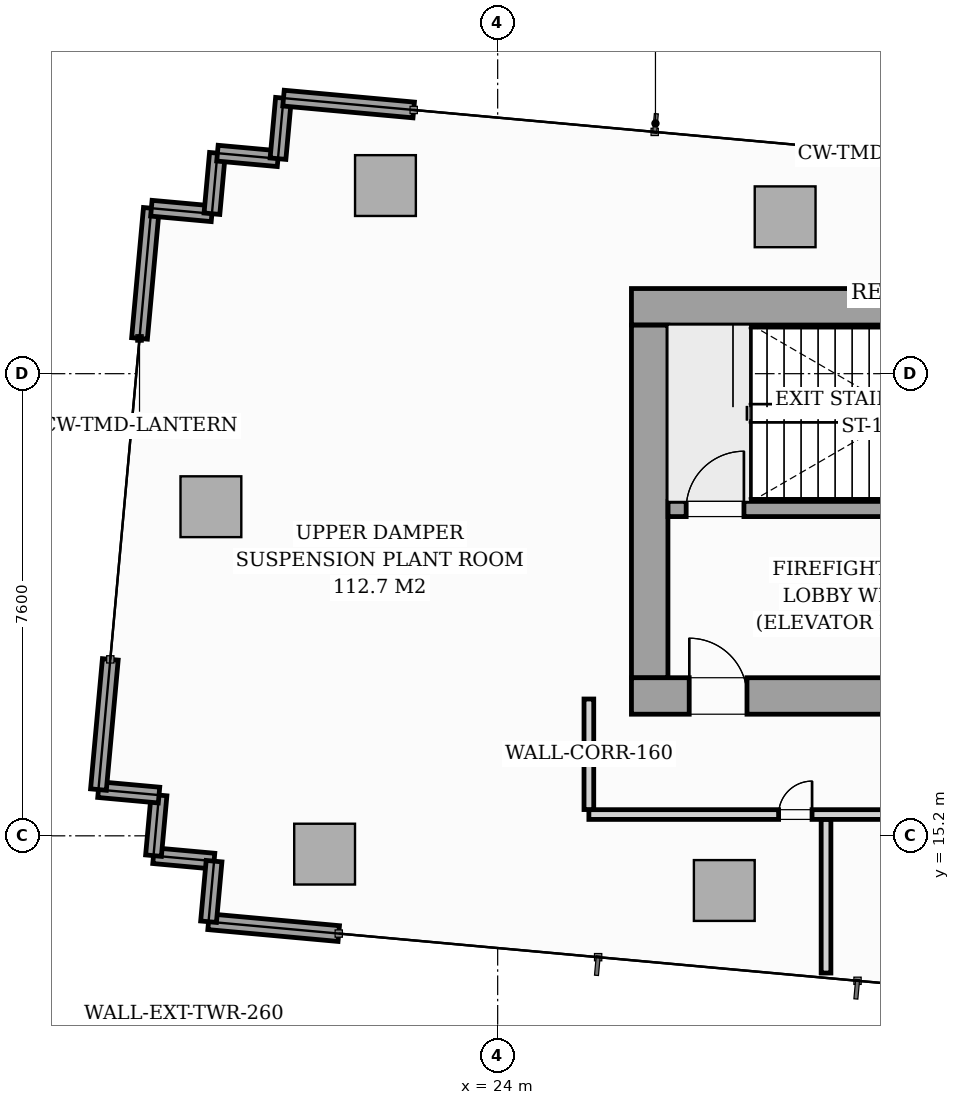
"""IFC4 building model, lengths in metres.
Left out: names, types, materials, properties, quantities, classifications, styles, units other than length and angle.
Written with IfcOpenShell. Run it as: python <this file> out.ifc"""

import sys

from ifc_helpers import new_model, si_unit, direction, frame, frame_2d, origin, origin_2d, place, context, subcontext, project, spatial, rectangle, i_section, extrude, source, transform, mapped, element, fill, save


model = new_model("IFC4")
c1 = context("Model", 3, precision=1e-05, world=origin(), true_north=direction((0.0, 1.0)))
c2 = subcontext(c1, "Body", "Model", "MODEL_VIEW")
j1 = project(units=[si_unit("LENGTHUNIT", "METRE"), si_unit("PLANEANGLEUNIT", "RADIAN")], contexts=[c1])
p1 = place(None, origin())
s1 = spatial("IfcSite", under=j1, at=p1, CompositionType="ELEMENT")
p2 = place(p1, origin())
s2 = spatial("IfcBuilding", under=s1, at=p2, CompositionType="ELEMENT")
p3 = place(p2, frame((0.0, 0.0, 270.8)))
s3 = spatial("IfcBuildingStorey", under=s2, at=p3, CompositionType="ELEMENT", Elevation=270.8)
m1 = source(origin(), c2, "Body", "SweptSolid", [
    extrude(i_section(OverallWidth=0.404, OverallDepth=0.407, WebThickness=0.027, FlangeThickness=0.044, FilletRadius=0.018, at=origin_2d()), origin(), (0.0, 0.0, 1.0), 6.496),
])
for number, where, z_axis, x_axis in (
    (1, (26.4, 17.4, 0.002), (0.0, 0.0, 1.0), (1.0, 0.0, 0.0)),
    (2, (26.4, 24.0, 0.002), (0.0, 0.0, 1.0), (1.0, 0.0, 0.0)),
):
    element("IfcColumn", number, at=place(p3, frame(where, z_axis=z_axis, x_axis=x_axis)), inside=s3, PredefinedType="PILASTER", context=c2, shape_type="MappedRepresentation", body=[
        mapped(m1, transform((0.0, 0.0, 0.0), scale=1.0)),
    ])
m2 = source(origin(), c2, "Body", "SweptSolid", [
    extrude(rectangle(XDim=1.0, YDim=1.0, at=origin_2d()), origin(), (0.0, 0.0, 1.0), 6.496),
])
for number, where, z_axis, x_axis in (
    (3, (21.154, 14.899, 0.002), (0.0, 0.0, 1.0), (0.996, -0.091, 0.0)),
    (4, (27.727, 14.301, 0.002), (0.0, 0.0, 1.0), (0.996, -0.091, 0.0)),
    (5, (22.155, 25.894, 0.002), (0.0, 0.0, 1.0), (0.996, -0.091, 0.0)),
    (6, (28.728, 25.38, 0.002), (0.0, 0.0, 1.0), (0.996, -0.091, 0.0)),
    (7, (19.284, 20.612, 0.002), (0.0, 0.0, 1.0), (0.996, -0.091, 0.0)),
):
    element("IfcColumn", number, at=place(p3, frame(where, z_axis=z_axis, x_axis=x_axis)), inside=s3, PredefinedType="COLUMN", context=c2, shape_type="MappedRepresentation", body=[
        mapped(m2, transform((0.0, 0.0, 0.0), scale=1.0)),
    ])
p4 = place(p3, frame((19.336, 14.783, 0.0), z_axis=(0.0, 0.0, 1.0), x_axis=(-0.995891205479, 0.090557754224, 0.0)))
e8 = element("IfcWall", 8, at=p4, inside=s3, PredefinedType="STANDARD", context=c2, shape_type="SweptSolid", body=[
    extrude(rectangle(XDim=1.0, YDim=0.26, at=frame_2d((0.5, 0.0))), origin(), (0.0, 0.0, 1.0), 6.22),
])
p5 = place(p3, frame((18.34, 14.874, 0.0), z_axis=(0.0, 0.0, 1.0), x_axis=(0.090821912176, 0.995867149909, 0.0)))
e9 = element("IfcWall", 9, at=p5, inside=s3, PredefinedType="STANDARD", context=c2, shape_type="SweptSolid", body=[
    extrude(rectangle(XDim=1.0, YDim=0.26, at=frame_2d((0.5, 0.0))), origin(), (0.0, 0.0, 1.0), 6.22),
])
p6 = place(p3, frame((18.431, 15.87, 0.0), z_axis=(0.0, 0.0, 1.0), x_axis=(-0.995891205479, 0.090557754224, 0.0)))
e10 = element("IfcWall", 10, at=p6, inside=s3, PredefinedType="STANDARD", context=c2, shape_type="SweptSolid", body=[
    extrude(rectangle(XDim=1.0, YDim=0.26, at=frame_2d((0.5, 0.0))), origin(), (0.0, 0.0, 1.0), 6.22),
])
p7 = place(p3, frame((17.435, 15.96, 0.0), z_axis=(0.0, 0.0, 1.0), x_axis=(0.090720017492, 0.995876437329, 0.0)))
e11 = element("IfcWall", 11, at=p7, inside=s3, PredefinedType="STANDARD", context=c2, shape_type="SweptSolid", body=[
    extrude(rectangle(XDim=2.15, YDim=0.26, at=frame_2d((1.075, 0.0))), origin(), (0.0, 0.0, 1.0), 6.22),
])
p8 = place(p3, frame((18.11, 23.38, 0.0), z_axis=(0.0, 0.0, 1.0), x_axis=(0.090617654952, 0.995885756807, 0.0)))
e12 = element("IfcWall", 12, at=p8, inside=s3, PredefinedType="STANDARD", context=c2, shape_type="SweptSolid", body=[
    extrude(rectangle(XDim=2.15, YDim=0.26, at=frame_2d((1.075, 0.0))), origin(), (0.0, 0.0, 1.0), 6.22),
])
for number, where, z_axis, x_axis in (
    (13, (18.305, 25.521, 0.0), (0.0, 0.0, 1.0), (0.996, -0.091, 0.0)),
    (14, (19.301, 25.43, 0.0), (0.0, 0.0, 1.0), (0.091, 0.996, 0.0)),
    (15, (19.392, 26.426, 0.0), (0.0, 0.0, 1.0), (0.996, -0.091, 0.0)),
    (16, (20.387, 26.336, 0.0), (0.0, 0.0, 1.0), (0.091, 0.996, 0.0)),
):
    element("IfcWall", number, at=place(p3, frame(where, z_axis=z_axis, x_axis=x_axis)), inside=s3, PredefinedType="STANDARD", context=c2, shape_type="SweptSolid", body=[
        extrude(rectangle(XDim=1.0, YDim=0.26, at=frame_2d((0.5, 0.0))), origin(), (0.0, 0.0, 1.0), 6.22),
    ])
p9 = place(p3, frame((20.478, 27.332, 0.0), z_axis=(0.0, 0.0, 1.0), x_axis=(0.995885756807, -0.090617654952, 0.0)))
e17 = element("IfcWall", 17, at=p9, inside=s3, PredefinedType="STANDARD", context=c2, shape_type="SweptSolid", body=[
    extrude(rectangle(XDim=2.15, YDim=0.26, at=frame_2d((1.075, 0.0))), origin(), (0.0, 0.0, 1.0), 6.22),
])
p10 = place(p3, frame((21.387, 13.593, 0.0), z_axis=(0.0, 0.0, 1.0), x_axis=(-0.995876437329, 0.090720017492, 0.0)))
e18 = element("IfcWall", 18, at=p10, inside=s3, PredefinedType="STANDARD", context=c2, shape_type="SweptSolid", body=[
    extrude(rectangle(XDim=2.15, YDim=0.26, at=frame_2d((1.075, 0.0))), origin(), (0.0, 0.0, 1.0), 6.22),
])
p11 = place(p3, frame((19.245, 13.788, 0.0), z_axis=(0.0, 0.0, 1.0), x_axis=(0.090821912176, 0.995867149909, 0.0)))
e19 = element("IfcWall", 19, at=p11, inside=s3, PredefinedType="STANDARD", context=c2, shape_type="SweptSolid", body=[
    extrude(rectangle(XDim=1.0, YDim=0.26, at=frame_2d((0.5, 0.0))), origin(), (0.0, 0.0, 1.0), 6.22),
])
p12 = place(p3, frame((26.2, 17.5, 0.0), z_axis=(0.0, 0.0, 1.0), x_axis=(1.0, 0.0, 0.0)))
e20 = element("IfcWall", 20, at=p12, inside=s3, PredefinedType="SHEAR", context=c2, shape_type="SweptSolid", body=[
    extrude(rectangle(XDim=19.6, YDim=0.6, at=frame_2d((9.8, 0.0))), origin(), (0.0, 0.0, 1.0), 6.5),
])
p13 = place(p12, frame((0.95, 0.0, 0.0)))
e21 = element("IfcOpeningElement", 21, at=p13, cuts=e20, PredefinedType="OPENING", context=c2, shape_type="SweptSolid", body=[
    extrude(rectangle(XDim=0.95, YDim=2.06, at=frame_2d((0.475, 1.03))), frame((0.0, 0.31, 0.0), z_axis=(0.0, -1.0, 0.0), x_axis=(1.0, 0.0, 0.0)), (0.0, 0.0, 1.0), 0.62),
])
p14 = place(p12, frame((9.38, 0.0, 0.0)))
e22 = element("IfcOpeningElement", 22, at=p14, cuts=e20, PredefinedType="OPENING", context=c2, shape_type="SweptSolid", body=[
    extrude(rectangle(XDim=0.9, YDim=2.06, at=frame_2d((0.45, 1.03))), frame((0.0, 0.31, 0.0), z_axis=(0.0, -1.0, 0.0), x_axis=(1.0, 0.0, 0.0)), (0.0, 0.0, 1.0), 0.62),
])
p15 = place(p12, frame((17.55, 0.0, 0.0)))
e23 = element("IfcOpeningElement", 23, at=p15, cuts=e20, PredefinedType="OPENING", context=c2, shape_type="SweptSolid", body=[
    extrude(rectangle(XDim=0.95, YDim=2.06, at=frame_2d((0.475, 1.03))), frame((0.0, 0.31, 0.0), z_axis=(0.0, -1.0, 0.0), x_axis=(1.0, 0.0, 0.0)), (0.0, 0.0, 1.0), 0.62),
])
p16 = place(p3, frame((26.2, 23.9, 0.0), z_axis=(0.0, 0.0, 1.0), x_axis=(1.0, 0.0, 0.0)))
e24 = element("IfcWall", 24, at=p16, inside=s3, PredefinedType="SHEAR", context=c2, shape_type="SweptSolid", body=[
    extrude(rectangle(XDim=19.6, YDim=0.6, at=frame_2d((9.8, 0.0))), origin(), (0.0, 0.0, 1.0), 6.5),
])
p17 = place(p3, frame((26.5, 17.802, 0.0), z_axis=(0.0, 0.0, 1.0), x_axis=(0.0, 1.0, 0.0)))
e25 = element("IfcWall", 25, at=p17, inside=s3, PredefinedType="SHEAR", context=c2, shape_type="SweptSolid", body=[
    extrude(rectangle(XDim=5.796, YDim=0.6, at=frame_2d((2.898, 0.0))), origin(), (0.0, 0.0, 1.0), 6.5),
])
p18 = place(p3, frame((26.802, 20.575, 0.0), z_axis=(0.0, 0.0, 1.0), x_axis=(1.0, 0.0, 0.0)))
e26 = element("IfcWall", 26, at=p18, inside=s3, PredefinedType="SOLIDWALL", context=c2, shape_type="SweptSolid", body=[
    extrude(rectangle(XDim=8.148, YDim=0.25, at=frame_2d((4.074, 0.0))), origin(), (0.0, 0.0, 1.0), 6.5),
])
p19 = place(p18, frame((0.298, 0.0, 0.0)))
e27 = element("IfcOpeningElement", 27, at=p19, cuts=e26, PredefinedType="OPENING", context=c2, shape_type="SweptSolid", body=[
    extrude(rectangle(XDim=0.95, YDim=2.06, at=frame_2d((0.475, 1.03))), frame((0.0, 0.135, 0.0), z_axis=(0.0, -1.0, 0.0), x_axis=(1.0, 0.0, 0.0)), (0.0, 0.0, 1.0), 0.27),
])
p20 = place(p3, frame((25.5, 15.55, 0.0), z_axis=(0.0, 0.0, 1.0), x_axis=(1.0, 0.0, 0.0)))
e28 = element("IfcWall", 28, at=p20, inside=s3, PredefinedType="PARTITIONING", context=c2, shape_type="SweptSolid", body=[
    extrude(rectangle(XDim=21.0, YDim=0.16, at=frame_2d((10.5, 0.0))), origin(), (0.0, 0.0, 1.0), 5.785),
])
p21 = place(p20, frame((3.12, 0.0, 0.0)))
e29 = element("IfcOpeningElement", 29, at=p21, cuts=e28, PredefinedType="OPENING", context=c2, shape_type="SweptSolid", body=[
    extrude(rectangle(XDim=0.55, YDim=2.02, at=frame_2d((0.275, 1.01))), frame((0.0, 0.09, 0.0), z_axis=(0.0, -1.0, 0.0), x_axis=(1.0, 0.0, 0.0)), (0.0, 0.0, 1.0), 0.18),
])
p22 = place(p20, frame((5.45, 0.0, 0.0)))
e30 = element("IfcOpeningElement", 30, at=p22, cuts=e28, PredefinedType="OPENING", context=c2, shape_type="SweptSolid", body=[
    extrude(rectangle(XDim=1.2, YDim=2.08, at=frame_2d((0.6, 1.04))), frame((0.0, 0.09, 0.0), z_axis=(0.0, -1.0, 0.0), x_axis=(1.0, 0.0, 0.0)), (0.0, 0.0, 1.0), 0.18),
])
p23 = place(p20, frame((17.1, 0.0, 0.0)))
e31 = element("IfcOpeningElement", 31, at=p23, cuts=e28, PredefinedType="OPENING", context=c2, shape_type="SweptSolid", body=[
    extrude(rectangle(XDim=1.2, YDim=2.08, at=frame_2d((0.6, 1.04))), frame((0.0, 0.09, 0.0), z_axis=(0.0, -1.0, 0.0), x_axis=(1.0, 0.0, 0.0)), (0.0, 0.0, 1.0), 0.18),
])
p24 = place(p3, frame((25.5, 15.632, 0.0), z_axis=(0.0, 0.0, 1.0), x_axis=(0.0, 1.0, 0.0)))
e32 = element("IfcWall", 32, at=p24, inside=s3, PredefinedType="PARTITIONING", context=c2, shape_type="SweptSolid", body=[
    extrude(rectangle(XDim=1.818, YDim=0.16, at=frame_2d((0.909, 0.0))), origin(), (0.0, 0.0, 1.0), 6.22),
])
p25 = place(p3, frame((29.4, 12.944, 0.0), z_axis=(0.0, 0.0, 1.0), x_axis=(0.0, 1.0, 0.0)))
e33 = element("IfcWall", 33, at=p25, inside=s3, PredefinedType="PARTITIONING", context=c2, shape_type="SweptSolid", body=[
    extrude(rectangle(XDim=2.524, YDim=0.16, at=frame_2d((1.262, 0.0))), origin(), (0.0, 0.0, 1.0), 6.22),
])
m3 = source(origin(), c2, "Body", "SweptSolid", [
    extrude(rectangle(XDim=0.95, YDim=2.06, at=frame_2d((0.475, 1.03))), frame((0.0, 0.025, 0.0), z_axis=(0.0, -1.0, 0.0), x_axis=(1.0, 0.0, 0.0)), (0.0, 0.0, 1.0), 0.05),
])
p26 = place(p13, origin())
e34 = element("IfcDoor", 34, at=p26, inside=s3, OperationType="SINGLE_SWING_LEFT", PredefinedType="DOOR", context=c2, shape_type="MappedRepresentation", body=[
    mapped(m3, transform((0.0, 0.0, 0.0), scale=1.0)),
])
fill(e21, e34)
p27 = place(p19, origin())
e35 = element("IfcDoor", 35, at=p27, inside=s3, OperationType="SINGLE_SWING_RIGHT", PredefinedType="DOOR", context=c2, shape_type="MappedRepresentation", body=[
    mapped(m3, transform((0.0, 0.0, 0.0), scale=1.0)),
])
fill(e27, e35)
m4 = source(origin(), c2, "Body", "SweptSolid", [
    extrude(rectangle(XDim=0.55, YDim=2.02, at=frame_2d((0.275, 1.01))), frame((0.0, 0.025, 0.0), z_axis=(0.0, -1.0, 0.0), x_axis=(1.0, 0.0, 0.0)), (0.0, 0.0, 1.0), 0.05),
])
p28 = place(p21, origin())
e36 = element("IfcDoor", 36, at=p28, inside=s3, OperationType="SINGLE_SWING_RIGHT", PredefinedType="DOOR", context=c2, shape_type="MappedRepresentation", body=[
    mapped(m4, transform((0.0, 0.0, 0.0), scale=1.0)),
])
fill(e29, e36)
save(model, sys.argv[1])
